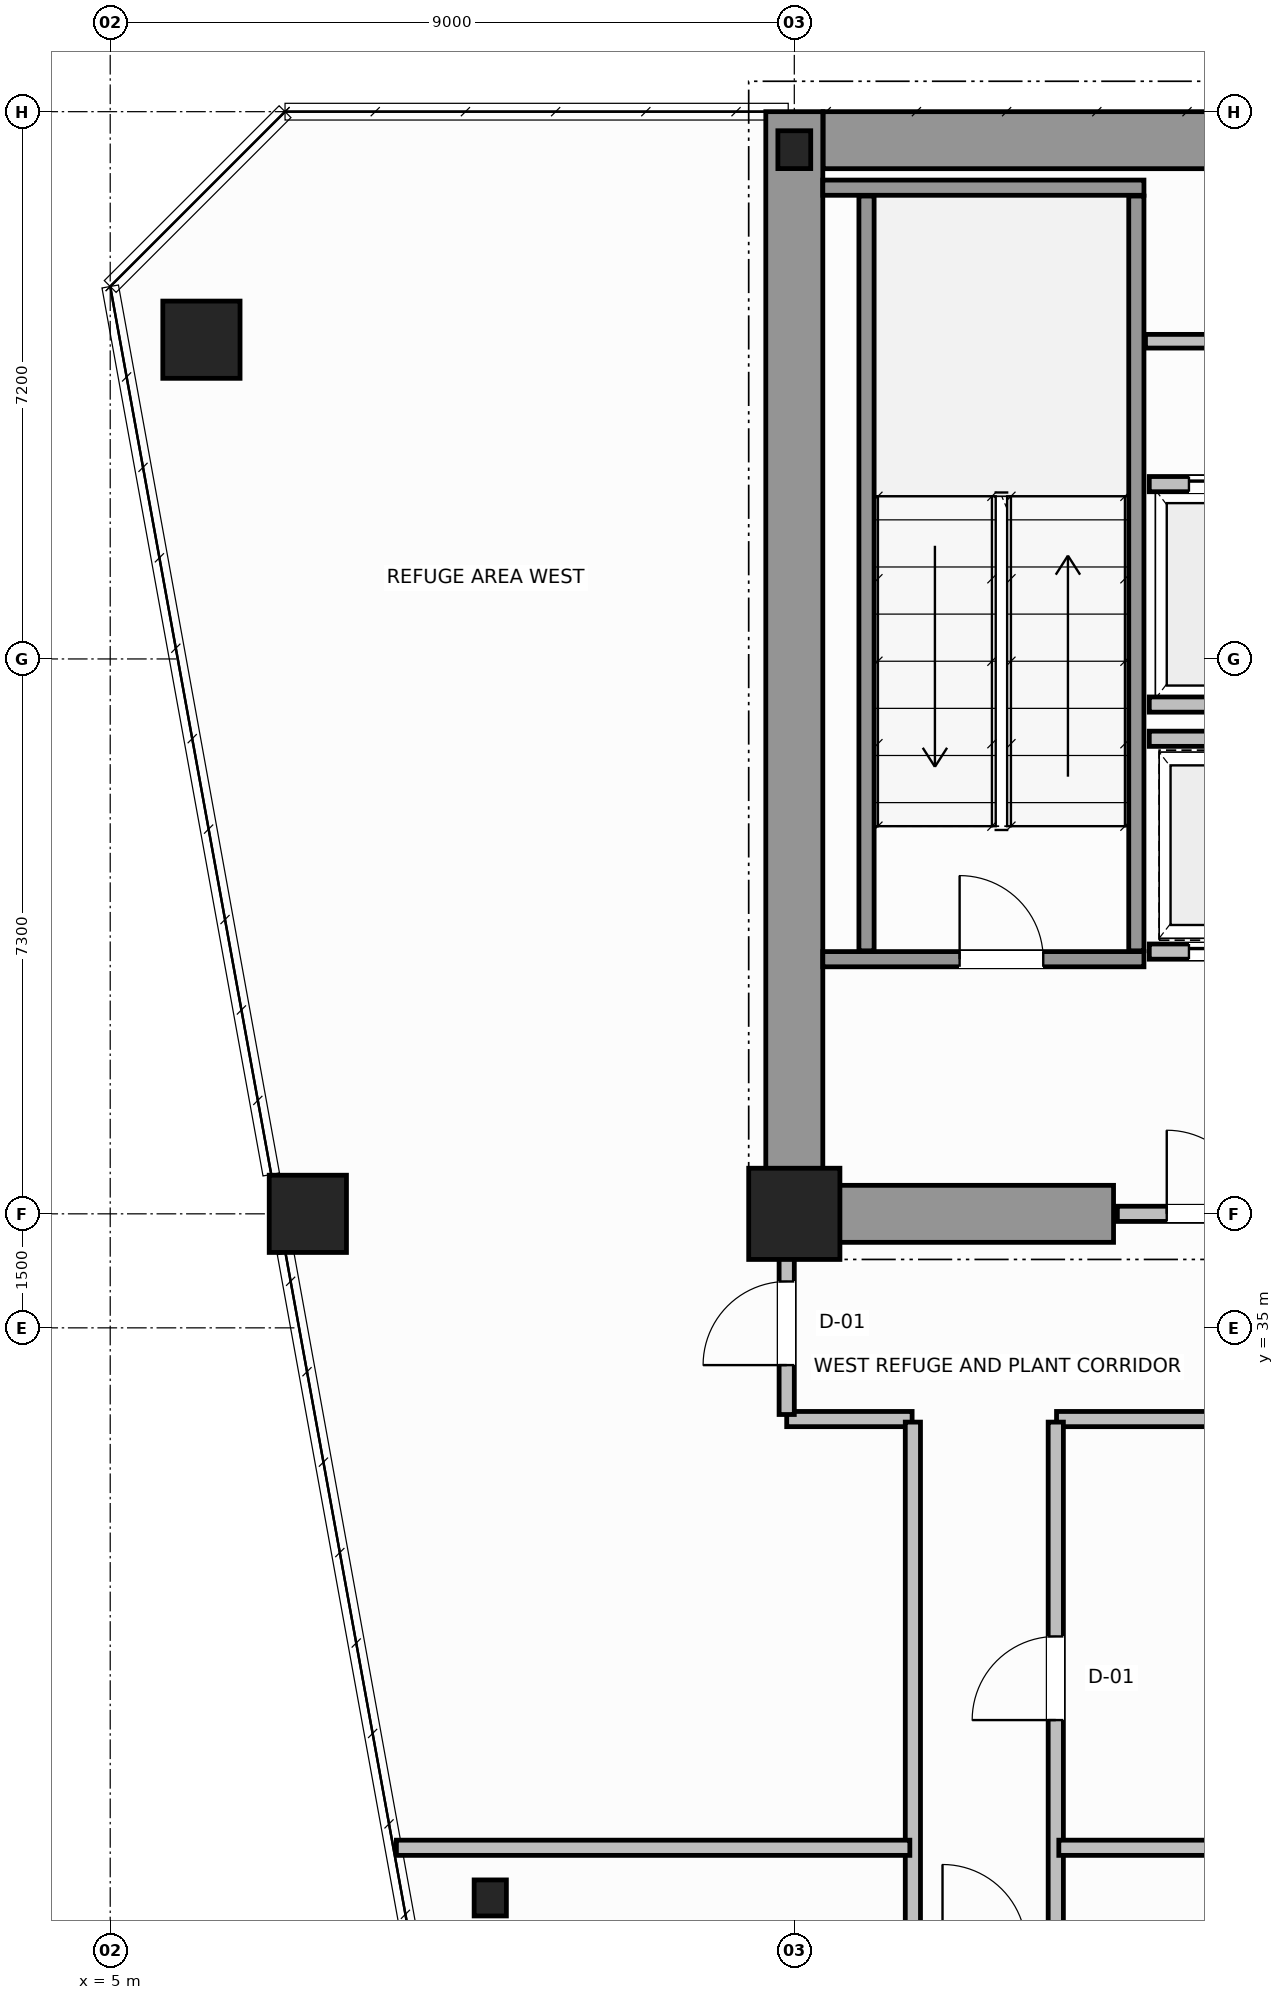
"""IFC4 building model, lengths in metres.
Left out: names, types, materials, properties, quantities, classifications, styles, units other than length and angle.
Written with IfcOpenShell. Run it as: python <this file> out.ifc"""

import sys

from ifc_helpers import new_model, si_unit, direction, frame, frame_2d, origin, origin_2d, place, context, subcontext, project, spatial, rectangle, hollow_circle, i_section, extrude, source, transform, mapped, element, fill, save


model = new_model("IFC4")
c1 = context("Model", 3, precision=1e-05, world=origin(), true_north=direction((0.0, 1.0)))
c2 = subcontext(c1, "Body", "Model", "MODEL_VIEW")
j1 = project(units=[si_unit("LENGTHUNIT", "METRE"), si_unit("PLANEANGLEUNIT", "RADIAN")], contexts=[c1])
p1 = place(None, origin())
s1 = spatial("IfcSite", under=j1, at=p1, CompositionType="ELEMENT")
p2 = place(p1, origin())
s2 = spatial("IfcBuilding", under=s1, at=p2, CompositionType="ELEMENT")
p3 = place(p2, frame((0.0, 0.0, 149.0)))
s3 = spatial("IfcBuildingStorey", under=s2, at=p3, CompositionType="ELEMENT", Elevation=149.0)
m1 = source(origin(), c2, "Body", "SweptSolid", [
    extrude(rectangle(XDim=1.2, YDim=1.2, at=origin_2d()), origin(), (0.0, 0.0, 1.0), 4.8),
])
p4 = place(p3, frame((14.0, 36.5, 0.0), z_axis=(0.0, 0.0, 1.0), x_axis=(1.0, 0.0, 0.0)))
e1 = element("IfcColumn", 1, at=p4, inside=s3, PredefinedType="COLUMN", context=c2, shape_type="MappedRepresentation", body=[
    mapped(m1, transform((0.0, 0.0, 0.0), scale=1.0)),
])
m2 = source(origin(), c2, "Body", "SweptSolid", [
    extrude(i_section(OverallWidth=0.432, OverallDepth=0.498, WebThickness=0.055, FlangeThickness=0.068, FilletRadius=0.015, at=origin_2d()), origin(), (0.0, 0.0, 1.0), 4.8),
])
p5 = place(p3, frame((14.0, 50.5, 0.0), z_axis=(0.0, 0.0, 1.0), x_axis=(1.0, 0.0, 0.0)))
e2 = element("IfcColumn", 2, at=p5, inside=s3, PredefinedType="COLUMN", context=c2, shape_type="MappedRepresentation", body=[
    mapped(m2, transform((0.0, 0.0, 0.0), scale=1.0)),
])
m3 = source(origin(), c2, "Body", "SweptSolid", [
    extrude(hollow_circle(Radius=0.508, WallThickness=0.045, at=origin_2d()), origin(), (0.0, 0.0, 1.0), 4.8),
])
for number, where, z_axis, x_axis in (
    (3, (6.2, 48.0, 0.0), (0.0, 0.0, 1.0), (1.0, 0.0, 0.0)),
    (4, (7.6, 36.5, 0.0), (0.0, 0.0, 1.0), (1.0, 0.0, 0.0)),
):
    element("IfcColumn", number, at=place(p3, frame(where, z_axis=z_axis, x_axis=x_axis)), inside=s3, PredefinedType="COLUMN", context=c2, shape_type="MappedRepresentation", body=[
        mapped(m3, transform((0.0, 0.0, 0.0), scale=1.0)),
    ])
m4 = source(origin(), c2, "Body", "SweptSolid", [
    extrude(i_section(OverallWidth=0.424, OverallDepth=0.474, WebThickness=0.047, FlangeThickness=0.065, FilletRadius=0.015, at=origin_2d()), origin(), (0.0, 0.0, 1.0), 4.8),
])
p6 = place(p3, frame((10.0, 27.5, 0.0), z_axis=(0.0, 0.0, 1.0), x_axis=(1.0, 0.0, 0.0)))
e5 = element("IfcColumn", 5, at=p6, inside=s3, PredefinedType="COLUMN", context=c2, shape_type="MappedRepresentation", body=[
    mapped(m4, transform((0.0, 0.0, 0.0), scale=1.0)),
])
p7 = place(p3, frame((14.379, 50.625, 0.0), z_axis=(0.0, 0.0, 1.0), x_axis=(1.0, 0.0, 0.0)))
e6 = element("IfcWall", 6, at=p7, inside=s3, PredefinedType="SHEAR", context=c2, shape_type="SweptSolid", body=[
    extrude(rectangle(XDim=19.619, YDim=0.75, at=frame_2d((9.81, 0.0))), origin(), (0.0, 0.0, 1.0), 4.8),
])
p8 = place(p3, frame((14.0, 36.5, 0.0), z_axis=(0.0, 0.0, 1.0), x_axis=(0.0, 1.0, 0.0)))
e7 = element("IfcWall", 7, at=p8, inside=s3, PredefinedType="SHEAR", context=c2, shape_type="SweptSolid", body=[
    extrude(rectangle(XDim=14.5, YDim=0.75, at=frame_2d((7.25, 0.0))), origin(), (0.0, 0.0, 1.0), 4.8),
])
p9 = place(p3, frame((14.395, 36.5, 0.0), z_axis=(0.0, 0.0, 1.0), x_axis=(1.0, 0.0, 0.0)))
e8 = element("IfcWall", 8, at=p9, inside=s3, PredefinedType="SHEAR", context=c2, shape_type="SweptSolid", body=[
    extrude(rectangle(XDim=3.805, YDim=0.75, at=frame_2d((1.902, 0.0))), origin(), (0.0, 0.0, 1.0), 3.34),
])
p10 = place(p3, frame((14.375, 39.85, 0.0), z_axis=(0.0, 0.0, 1.0), x_axis=(1.0, 0.0, 0.0)))
e9 = element("IfcWall", 9, at=p10, inside=s3, PredefinedType="SOLIDWALL", context=c2, shape_type="SweptSolid", body=[
    extrude(rectangle(XDim=4.225, YDim=0.2, at=frame_2d((2.113, 0.0))), origin(), (0.0, 0.0, 1.0), 4.8),
])
p11 = place(p10, frame((1.8, 0.0, 0.0)))
e10 = element("IfcOpeningElement", 10, at=p11, cuts=e9, PredefinedType="OPENING", context=c2, shape_type="SweptSolid", body=[
    extrude(rectangle(XDim=1.1, YDim=2.15, at=frame_2d((0.55, 1.075))), frame((0.0, 0.11, 0.0), z_axis=(0.0, -1.0, 0.0), x_axis=(1.0, 0.0, 0.0)), (0.0, 0.0, 1.0), 0.22),
])
p12 = place(p3, frame((14.375, 50.0, 0.0), z_axis=(0.0, 0.0, 1.0), x_axis=(1.0, 0.0, 0.0)))
e11 = element("IfcWall", 11, at=p12, inside=s3, PredefinedType="SOLIDWALL", context=c2, shape_type="SweptSolid", body=[
    extrude(rectangle(XDim=4.225, YDim=0.2, at=frame_2d((2.113, 0.0))), origin(), (0.0, 0.0, 1.0), 4.8),
])
for number, where, z_axis, x_axis in (
    (12, (14.95, 39.96, 0.0), (0.0, 0.0, 1.0), (0.0, 1.0, 0.0)),
    (13, (18.5, 39.96, 0.0), (0.0, 0.0, 1.0), (0.0, 1.0, 0.0)),
):
    element("IfcWall", number, at=place(p3, frame(where, z_axis=z_axis, x_axis=x_axis)), inside=s3, PredefinedType="SOLIDWALL", context=c2, shape_type="SweptSolid", body=[
        extrude(rectangle(XDim=9.93, YDim=0.2, at=frame_2d((4.965, 0.0))), origin(), (0.0, 0.0, 1.0), 4.8),
    ])
p13 = place(p3, frame((18.25, 36.5, 0.0), z_axis=(0.0, 0.0, 1.0), x_axis=(1.0, 0.0, 0.0)))
e14 = element("IfcWall", 14, at=p13, inside=s3, PredefinedType="SOLIDWALL", context=c2, shape_type="SweptSolid", body=[
    extrude(rectangle(XDim=2.47, YDim=0.2, at=frame_2d((1.235, 0.0))), origin(), (0.0, 0.0, 1.0), 3.33),
])
p14 = place(p13, frame((0.65, 0.0, 0.0)))
e15 = element("IfcOpeningElement", 15, at=p14, cuts=e14, PredefinedType="OPENING", context=c2, shape_type="SweptSolid", body=[
    extrude(rectangle(XDim=1.1, YDim=2.15, at=frame_2d((0.55, 1.075))), frame((0.0, 0.11, 0.0), z_axis=(0.0, -1.0, 0.0), x_axis=(1.0, 0.0, 0.0)), (0.0, 0.0, 1.0), 0.22),
])
p15 = place(p3, frame((18.67, 46.1, 0.0), z_axis=(0.0, 0.0, 1.0), x_axis=(1.0, 0.0, 0.0)))
e16 = element("IfcWall", 16, at=p15, inside=s3, PredefinedType="SOLIDWALL", context=c2, shape_type="SweptSolid", body=[
    extrude(rectangle(XDim=2.145, YDim=0.2, at=frame_2d((1.073, 0.0))), origin(), (0.0, 0.0, 1.0), 4.54),
])
p16 = place(p15, frame((0.522, 0.0, 0.0)))
e17 = element("IfcOpeningElement", 17, at=p16, cuts=e16, PredefinedType="OPENING", context=c2, shape_type="SweptSolid", body=[
    extrude(rectangle(XDim=1.1, YDim=2.15, at=frame_2d((0.55, 1.075))), frame((0.0, 0.11, 0.0), z_axis=(0.0, -1.0, 0.0), x_axis=(1.0, 0.0, 0.0)), (0.0, 0.0, 1.0), 0.22),
])
p17 = place(p3, frame((18.67, 43.2, 0.0), z_axis=(0.0, 0.0, 1.0), x_axis=(1.0, 0.0, 0.0)))
e18 = element("IfcWall", 18, at=p17, inside=s3, PredefinedType="SOLIDWALL", context=c2, shape_type="SweptSolid", body=[
    extrude(rectangle(XDim=2.145, YDim=0.2, at=frame_2d((1.073, 0.0))), origin(), (0.0, 0.0, 1.0), 4.54),
])
p18 = place(p3, frame((18.67, 39.95, 0.0), z_axis=(0.0, 0.0, 1.0), x_axis=(1.0, 0.0, 0.0)))
e19 = element("IfcWall", 19, at=p18, inside=s3, PredefinedType="SOLIDWALL", context=c2, shape_type="SweptSolid", body=[
    extrude(rectangle(XDim=2.145, YDim=0.2, at=frame_2d((1.073, 0.0))), origin(), (0.0, 0.0, 1.0), 4.54),
])
p19 = place(p18, frame((0.522, 0.0, 0.0)))
e20 = element("IfcOpeningElement", 20, at=p19, cuts=e19, PredefinedType="OPENING", context=c2, shape_type="SweptSolid", body=[
    extrude(rectangle(XDim=1.1, YDim=2.15, at=frame_2d((0.55, 1.075))), frame((0.0, 0.11, 0.0), z_axis=(0.0, -1.0, 0.0), x_axis=(1.0, 0.0, 0.0)), (0.0, 0.0, 1.0), 0.22),
])
p20 = place(p3, frame((18.67, 42.75, 0.0), z_axis=(0.0, 0.0, 1.0), x_axis=(1.0, 0.0, 0.0)))
e21 = element("IfcWall", 21, at=p20, inside=s3, PredefinedType="SOLIDWALL", context=c2, shape_type="SweptSolid", body=[
    extrude(rectangle(XDim=2.145, YDim=0.2, at=frame_2d((1.073, 0.0))), origin(), (0.0, 0.0, 1.0), 4.54),
])
p21 = place(p3, frame((18.62, 47.98, 0.0), z_axis=(0.0, 0.0, 1.0), x_axis=(1.0, 0.0, 0.0)))
e22 = element("IfcWall", 22, at=p21, inside=s3, PredefinedType="PLUMBINGWALL", context=c2, shape_type="SweptSolid", body=[
    extrude(rectangle(XDim=20.06, YDim=0.18, at=frame_2d((10.03, 0.0))), origin(), (0.0, 0.0, 1.0), 4.54),
])
p22 = place(p21, frame((3.5, 0.0, 0.0)))
e23 = element("IfcOpeningElement", 23, at=p22, cuts=e22, PredefinedType="OPENING", context=c2, shape_type="SweptSolid", body=[
    extrude(rectangle(XDim=0.9, YDim=2.15, at=frame_2d((0.45, 1.075))), frame((0.0, 0.1, 0.0), z_axis=(0.0, -1.0, 0.0), x_axis=(1.0, 0.0, 0.0)), (0.0, 0.0, 1.0), 0.2),
])
p23 = place(p21, frame((10.8, 0.0, 0.0)))
e24 = element("IfcOpeningElement", 24, at=p23, cuts=e22, PredefinedType="OPENING", context=c2, shape_type="SweptSolid", body=[
    extrude(rectangle(XDim=0.9, YDim=2.15, at=frame_2d((0.45, 1.075))), frame((0.0, 0.1, 0.0), z_axis=(0.0, -1.0, 0.0), x_axis=(1.0, 0.0, 0.0)), (0.0, 0.0, 1.0), 0.2),
])
p24 = place(p21, frame((16.8, 0.0, 0.0)))
e25 = element("IfcOpeningElement", 25, at=p24, cuts=e22, PredefinedType="OPENING", context=c2, shape_type="SweptSolid", body=[
    extrude(rectangle(XDim=0.9, YDim=2.15, at=frame_2d((0.45, 1.075))), frame((0.0, 0.1, 0.0), z_axis=(0.0, -1.0, 0.0), x_axis=(1.0, 0.0, 0.0)), (0.0, 0.0, 1.0), 0.2),
])
p25 = place(p3, frame((13.9, 33.8, 0.0), z_axis=(0.0, 0.0, 1.0), x_axis=(1.0, 0.0, 0.0)))
e26 = element("IfcWall", 26, at=p25, inside=s3, PredefinedType="SOLIDWALL", context=c2, shape_type="SweptSolid", body=[
    extrude(rectangle(XDim=1.65, YDim=0.2, at=frame_2d((0.825, 0.0))), origin(), (0.0, 0.0, 1.0), 4.54),
])
p26 = place(p3, frame((17.45, 33.8, 0.0), z_axis=(0.0, 0.0, 1.0), x_axis=(1.0, 0.0, 0.0)))
e27 = element("IfcWall", 27, at=p26, inside=s3, PredefinedType="SOLIDWALL", context=c2, shape_type="SweptSolid", body=[
    extrude(rectangle(XDim=10.91, YDim=0.2, at=frame_2d((5.455, 0.0))), origin(), (0.0, 0.0, 1.0), 4.54),
])
p27 = place(p26, frame((8.285, 0.0, 0.0)))
e28 = element("IfcOpeningElement", 28, at=p27, cuts=e27, PredefinedType="OPENING", context=c2, shape_type="SweptSolid", body=[
    extrude(rectangle(XDim=1.1, YDim=2.15, at=frame_2d((0.55, 1.075))), frame((0.0, 0.11, 0.0), z_axis=(0.0, -1.0, 0.0), x_axis=(1.0, 0.0, 0.0)), (0.0, 0.0, 1.0), 0.22),
])
p28 = place(p3, frame((13.9, 33.86, 0.0), z_axis=(0.0, 0.0, 1.0), x_axis=(0.0, 1.0, 0.0)))
e29 = element("IfcWall", 29, at=p28, inside=s3, PredefinedType="SOLIDWALL", context=c2, shape_type="SweptSolid", body=[
    extrude(rectangle(XDim=2.58, YDim=0.2, at=frame_2d((1.29, 0.0))), origin(), (0.0, 0.0, 1.0), 4.54),
])
p29 = place(p28, frame((0.65, 0.0, 0.0)))
e30 = element("IfcOpeningElement", 30, at=p29, cuts=e29, PredefinedType="OPENING", context=c2, shape_type="SweptSolid", body=[
    extrude(rectangle(XDim=1.1, YDim=2.15, at=frame_2d((0.55, 1.075))), frame((0.0, 0.11, 0.0), z_axis=(0.0, -1.0, 0.0), x_axis=(1.0, 0.0, 0.0)), (0.0, 0.0, 1.0), 0.22),
])
p30 = place(p3, frame((15.56, 26.84, 0.0), z_axis=(0.0, 0.0, 1.0), x_axis=(0.0, 1.0, 0.0)))
e31 = element("IfcWall", 31, at=p30, inside=s3, PredefinedType="SOLIDWALL", context=c2, shape_type="SweptSolid", body=[
    extrude(rectangle(XDim=6.92, YDim=0.2, at=frame_2d((3.46, 0.0))), origin(), (0.0, 0.0, 1.0), 4.54),
])
p31 = place(p3, frame((17.44, 26.84, 0.0), z_axis=(0.0, 0.0, 1.0), x_axis=(0.0, 1.0, 0.0)))
e32 = element("IfcWall", 32, at=p31, inside=s3, PredefinedType="SOLIDWALL", context=c2, shape_type="SweptSolid", body=[
    extrude(rectangle(XDim=6.92, YDim=0.2, at=frame_2d((3.46, 0.0))), origin(), (0.0, 0.0, 1.0), 4.54),
])
p32 = place(p31, frame((3.0, 0.0, 0.0)))
e33 = element("IfcOpeningElement", 33, at=p32, cuts=e32, PredefinedType="OPENING", context=c2, shape_type="SweptSolid", body=[
    extrude(rectangle(XDim=1.1, YDim=2.15, at=frame_2d((0.55, 1.075))), frame((0.0, 0.11, 0.0), z_axis=(0.0, -1.0, 0.0), x_axis=(1.0, 0.0, 0.0)), (0.0, 0.0, 1.0), 0.22),
])
p33 = place(p3, frame((8.765, 28.16, 0.0), z_axis=(0.0, 0.0, 1.0), x_axis=(1.0, 0.0, 0.0)))
e34 = element("IfcWall", 34, at=p33, inside=s3, PredefinedType="SOLIDWALL", context=c2, shape_type="SweptSolid", body=[
    extrude(rectangle(XDim=6.755, YDim=0.2, at=frame_2d((3.377, 0.0))), origin(), (0.0, 0.0, 1.0), 4.54),
])
p34 = place(p3, frame((17.48, 28.16, 0.0), z_axis=(0.0, 0.0, 1.0), x_axis=(1.0, 0.0, 0.0)))
e35 = element("IfcWall", 35, at=p34, inside=s3, PredefinedType="SOLIDWALL", context=c2, shape_type="SweptSolid", body=[
    extrude(rectangle(XDim=33.04, YDim=0.2, at=frame_2d((16.52, 0.0))), origin(), (0.0, 0.0, 1.0), 4.54),
])
m5 = source(origin(), c2, "Body", "SweptSolid", [
    extrude(rectangle(XDim=1.1, YDim=2.15, at=frame_2d((0.55, 1.075))), frame((0.0, 0.025, 0.0), z_axis=(0.0, -1.0, 0.0), x_axis=(1.0, 0.0, 0.0)), (0.0, 0.0, 1.0), 0.05),
])
p35 = place(p11, origin())
e36 = element("IfcDoor", 36, at=p35, inside=s3, OperationType="SINGLE_SWING_LEFT", PredefinedType="DOOR", context=c2, shape_type="MappedRepresentation", body=[
    mapped(m5, transform((0.0, 0.0, 0.0), scale=1.0)),
])
fill(e10, e36)
p36 = place(p14, origin())
e37 = element("IfcDoor", 37, at=p36, inside=s3, OperationType="SINGLE_SWING_RIGHT", PredefinedType="DOOR", context=c2, shape_type="MappedRepresentation", body=[
    mapped(m5, transform((0.0, 0.0, 0.0), scale=1.0)),
])
fill(e15, e37)
p37 = place(p16, origin())
e38 = element("IfcDoor", 38, at=p37, inside=s3, OperationType="DOUBLE_DOOR_SLIDING", PredefinedType="DOOR", context=c2, shape_type="MappedRepresentation", body=[
    mapped(m5, transform((0.0, 0.0, 0.0), scale=1.0)),
])
fill(e17, e38)
p38 = place(p19, origin())
e39 = element("IfcDoor", 39, at=p38, inside=s3, OperationType="DOUBLE_DOOR_SLIDING", PredefinedType="DOOR", context=c2, shape_type="MappedRepresentation", body=[
    mapped(m5, transform((0.0, 0.0, 0.0), scale=1.0)),
])
fill(e20, e39)
p39 = place(p29, origin())
e40 = element("IfcDoor", 40, at=p39, inside=s3, OperationType="SINGLE_SWING_LEFT", PredefinedType="DOOR", context=c2, shape_type="MappedRepresentation", body=[
    mapped(m5, transform((0.0, 0.0, 0.0), scale=1.0)),
])
fill(e30, e40)
p40 = place(p32, origin())
e41 = element("IfcDoor", 41, at=p40, inside=s3, OperationType="SINGLE_SWING_RIGHT", PredefinedType="DOOR", context=c2, shape_type="MappedRepresentation", body=[
    mapped(m5, transform((0.0, 0.0, 0.0), scale=1.0)),
])
fill(e33, e41)
save(model, sys.argv[1])
